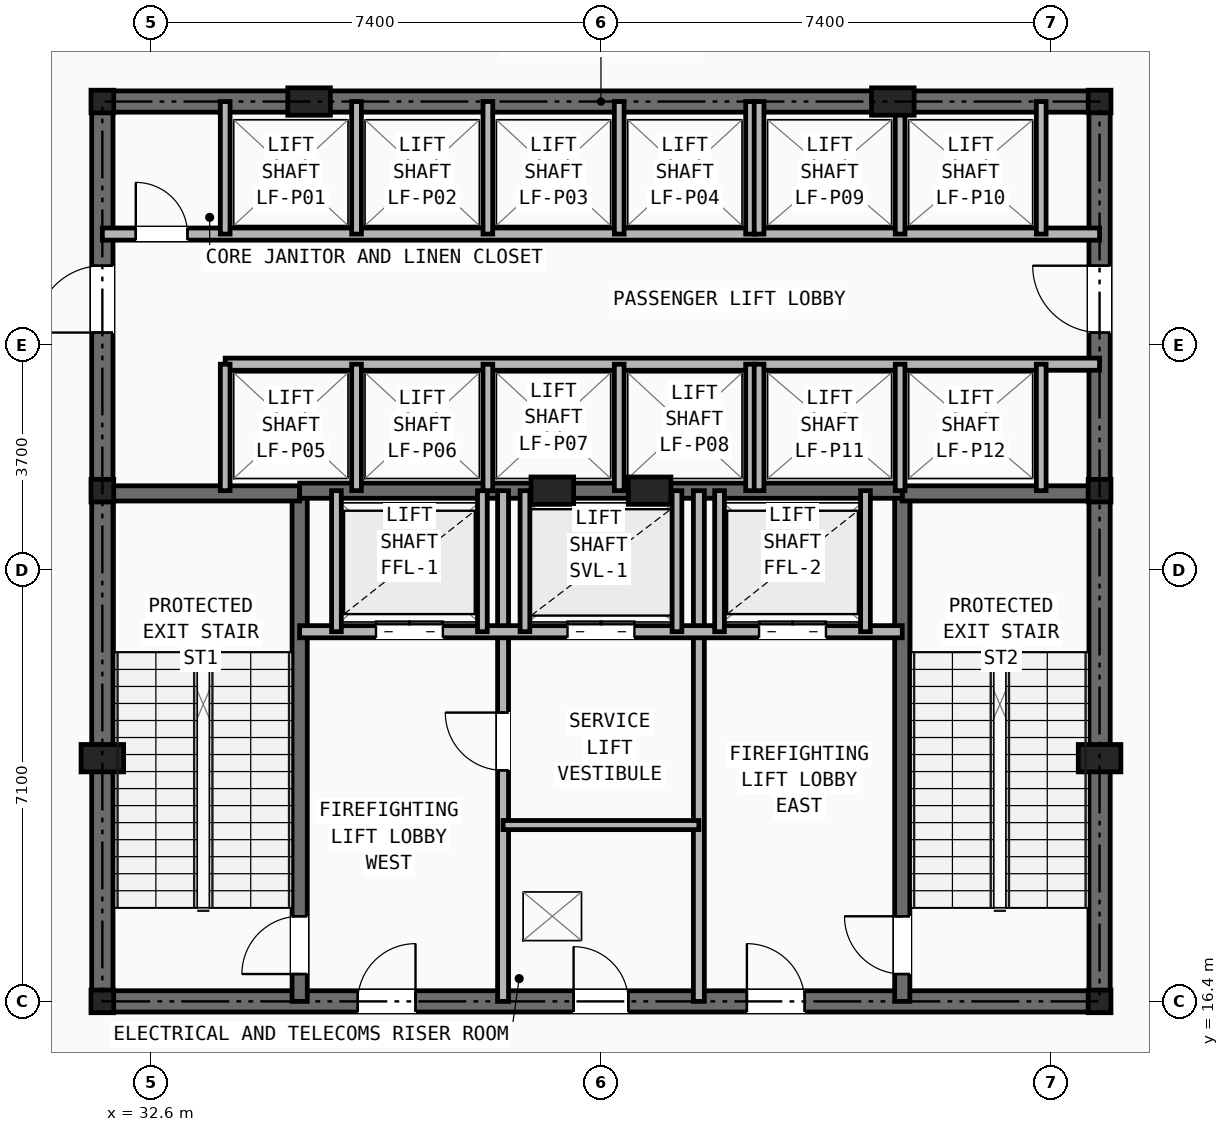
"""IFC4 building model, lengths in metres.
Left out: names, types, materials, properties, quantities, classifications, styles, units other than length and angle.
Written with IfcOpenShell. Run it as: python <this file> out.ifc"""

import sys

from ifc_helpers import new_model, si_unit, direction, frame, frame_2d, origin, origin_2d, place, context, subcontext, project, spatial, rectangle, i_section, extrude, element, fill, save


model = new_model("IFC4")
c1 = context("Model", 3, precision=1e-05, world=origin(), true_north=direction((0.0, 1.0)))
c2 = subcontext(c1, "Body", "Model", "MODEL_VIEW")
j1 = project(units=[si_unit("LENGTHUNIT", "METRE"), si_unit("PLANEANGLEUNIT", "RADIAN")], contexts=[c1])
p1 = place(None, origin())
s1 = spatial("IfcSite", under=j1, at=p1, CompositionType="ELEMENT")
p2 = place(p1, origin())
s2 = spatial("IfcBuilding", under=s1, at=p2, CompositionType="ELEMENT")
p3 = place(p2, frame((0.0, 0.0, 5.5)))
s3 = spatial("IfcBuildingStorey", under=s2, at=p3, CompositionType="ELEMENT", Elevation=5.5)
for number, where, z_axis, x_axis in (
    (1, (31.8, 16.4, 0.0), (0.0, 0.0, 1.0), (1.0, 0.0, 0.0)),
    (2, (48.2, 16.4, 0.0), (0.0, 0.0, 1.0), (1.0, 0.0, 0.0)),
    (3, (31.8, 24.8, 0.0), (0.0, 0.0, 1.0), (1.0, 0.0, 0.0)),
    (4, (48.2, 24.8, 0.0), (0.0, 0.0, 1.0), (1.0, 0.0, 0.0)),
    (5, (31.8, 31.2, 0.0), (0.0, 0.0, 1.0), (1.0, 0.0, 0.0)),
    (6, (48.2, 31.2, 0.0), (0.0, 0.0, 1.0), (1.0, 0.0, 0.0)),
):
    element("IfcColumn", number, at=place(p3, frame(where, z_axis=z_axis, x_axis=x_axis)), inside=s3, PredefinedType="COLUMN", context=c2, shape_type="SweptSolid", body=[
        extrude(i_section(OverallWidth=0.374, OverallDepth=0.372, WebThickness=0.016, FlangeThickness=0.026, at=origin_2d()), origin(), (0.0, 0.0, 1.0), 5.5),
    ])
for number, where, z_axis, x_axis in (
    (7, (31.8, 20.4, 0.0), (0.0, 0.0, 1.0), (1.0, 0.0, 0.0)),
    (8, (48.2, 20.4, 0.0), (0.0, 0.0, 1.0), (1.0, 0.0, 0.0)),
    (9, (35.2, 31.2, 0.0), (0.0, 0.0, 1.0), (1.0, 0.0, 0.0)),
    (10, (44.8, 31.2, 0.0), (0.0, 0.0, 1.0), (1.0, 0.0, 0.0)),
    (11, (39.2, 24.8, 0.0), (0.0, 0.0, 1.0), (1.0, 0.0, 0.0)),
    (12, (40.8, 24.8, 0.0), (0.0, 0.0, 1.0), (1.0, 0.0, 0.0)),
):
    element("IfcColumn", number, at=place(p3, frame(where, z_axis=z_axis, x_axis=x_axis)), inside=s3, PredefinedType="PILASTER", context=c2, shape_type="SweptSolid", body=[
        extrude(rectangle(XDim=0.7, YDim=0.45, at=origin_2d()), origin(), (0.0, 0.0, 1.0), 5.5),
    ])
p4 = place(p3, frame((31.8, 16.4, 0.0), z_axis=(0.0, 0.0, 1.0), x_axis=(1.0, 0.0, 0.0)))
e13 = element("IfcWall", 13, at=p4, inside=s3, PredefinedType="SHEAR", context=c2, shape_type="SweptSolid", body=[
    extrude(rectangle(XDim=16.4, YDim=0.35, at=frame_2d((8.2, 0.0))), origin(), (0.0, 0.0, 1.0), 5.18),
])
p5 = place(p4, frame((7.75, 0.0, 0.0)))
e14 = element("IfcOpeningElement", 14, at=p5, cuts=e13, PredefinedType="OPENING", context=c2, shape_type="SweptSolid", body=[
    extrude(rectangle(XDim=0.9, YDim=2.1, at=frame_2d((0.45, 1.05))), frame((0.0, 0.185, 0.0), z_axis=(0.0, -1.0, 0.0), x_axis=(1.0, 0.0, 0.0)), (0.0, 0.0, 1.0), 0.37),
])
p6 = place(p4, frame((4.2, 0.0, 0.0)))
e15 = element("IfcOpeningElement", 15, at=p6, cuts=e13, PredefinedType="OPENING", context=c2, shape_type="SweptSolid", body=[
    extrude(rectangle(XDim=0.95, YDim=2.1, at=frame_2d((0.475, 1.05))), frame((0.0, 0.185, 0.0), z_axis=(0.0, -1.0, 0.0), x_axis=(1.0, 0.0, 0.0)), (0.0, 0.0, 1.0), 0.37),
])
p7 = place(p4, frame((10.6, 0.0, 0.0)))
e16 = element("IfcOpeningElement", 16, at=p7, cuts=e13, PredefinedType="OPENING", context=c2, shape_type="SweptSolid", body=[
    extrude(rectangle(XDim=0.95, YDim=2.1, at=frame_2d((0.475, 1.05))), frame((0.0, 0.185, 0.0), z_axis=(0.0, -1.0, 0.0), x_axis=(1.0, 0.0, 0.0)), (0.0, 0.0, 1.0), 0.37),
])
p8 = place(p3, frame((31.8, 31.2, 0.0), z_axis=(0.0, 0.0, 1.0), x_axis=(1.0, 0.0, 0.0)))
e17 = element("IfcWall", 17, at=p8, inside=s3, PredefinedType="SHEAR", context=c2, shape_type="SweptSolid", body=[
    extrude(rectangle(XDim=16.4, YDim=0.35, at=frame_2d((8.2, 0.0))), origin(), (0.0, 0.0, 1.0), 5.18),
])
p9 = place(p3, frame((31.8, 16.4, 0.0), z_axis=(0.0, 0.0, 1.0), x_axis=(0.0, 1.0, 0.0)))
e18 = element("IfcWall", 18, at=p9, inside=s3, PredefinedType="SHEAR", context=c2, shape_type="SweptSolid", body=[
    extrude(rectangle(XDim=14.8, YDim=0.35, at=frame_2d((7.4, 0.0))), origin(), (0.0, 0.0, 1.0), 5.18),
])
p10 = place(p9, frame((11.0, 0.0, 0.0)))
e19 = element("IfcOpeningElement", 19, at=p10, cuts=e18, PredefinedType="OPENING", context=c2, shape_type="SweptSolid", body=[
    extrude(rectangle(XDim=1.1, YDim=2.15, at=frame_2d((0.55, 1.075))), frame((0.0, 0.185, 0.0), z_axis=(0.0, -1.0, 0.0), x_axis=(1.0, 0.0, 0.0)), (0.0, 0.0, 1.0), 0.37),
])
p11 = place(p3, frame((48.2, 16.4, 0.0), z_axis=(0.0, 0.0, 1.0), x_axis=(0.0, 1.0, 0.0)))
e20 = element("IfcWall", 20, at=p11, inside=s3, PredefinedType="SHEAR", context=c2, shape_type="SweptSolid", body=[
    extrude(rectangle(XDim=14.8, YDim=0.35, at=frame_2d((7.4, 0.0))), origin(), (0.0, 0.0, 1.0), 5.18),
])
p12 = place(p11, frame((11.0, 0.0, 0.0)))
e21 = element("IfcOpeningElement", 21, at=p12, cuts=e20, PredefinedType="OPENING", context=c2, shape_type="SweptSolid", body=[
    extrude(rectangle(XDim=1.1, YDim=2.15, at=frame_2d((0.55, 1.075))), frame((0.0, 0.185, 0.0), z_axis=(0.0, -1.0, 0.0), x_axis=(1.0, 0.0, 0.0)), (0.0, 0.0, 1.0), 0.37),
])
p13 = place(p3, frame((35.045, 16.4, 0.0), z_axis=(0.0, 0.0, 1.0), x_axis=(0.0, 1.0, 0.0)))
e22 = element("IfcWall", 22, at=p13, inside=s3, PredefinedType="SHEAR", context=c2, shape_type="SweptSolid", body=[
    extrude(rectangle(XDim=8.4, YDim=0.25, at=frame_2d((4.2, 0.0))), origin(), (0.0, 0.0, 1.0), 5.18),
])
p14 = place(p13, frame((0.45, 0.0, 0.0)))
e23 = element("IfcOpeningElement", 23, at=p14, cuts=e22, PredefinedType="OPENING", context=c2, shape_type="SweptSolid", body=[
    extrude(rectangle(XDim=0.95, YDim=2.1, at=frame_2d((0.475, 1.05))), frame((0.0, 0.135, 0.0), z_axis=(0.0, -1.0, 0.0), x_axis=(1.0, 0.0, 0.0)), (0.0, 0.0, 1.0), 0.27),
])
p15 = place(p3, frame((31.8, 24.755, 0.0), z_axis=(0.0, 0.0, 1.0), x_axis=(1.0, 0.0, 0.0)))
e24 = element("IfcWall", 24, at=p15, inside=s3, PredefinedType="SHEAR", context=c2, shape_type="SweptSolid", body=[
    extrude(rectangle(XDim=3.245, YDim=0.25, at=frame_2d((1.623, 0.0))), origin(), (0.0, 0.0, 1.0), 5.18),
])
p16 = place(p3, frame((44.955, 16.4, 0.0), z_axis=(0.0, 0.0, 1.0), x_axis=(0.0, 1.0, 0.0)))
e25 = element("IfcWall", 25, at=p16, inside=s3, PredefinedType="SHEAR", context=c2, shape_type="SweptSolid", body=[
    extrude(rectangle(XDim=8.4, YDim=0.25, at=frame_2d((4.2, 0.0))), origin(), (0.0, 0.0, 1.0), 5.18),
])
p17 = place(p16, frame((0.45, 0.0, 0.0)))
e26 = element("IfcOpeningElement", 26, at=p17, cuts=e25, PredefinedType="OPENING", context=c2, shape_type="SweptSolid", body=[
    extrude(rectangle(XDim=0.95, YDim=2.1, at=frame_2d((0.475, 1.05))), frame((0.0, 0.135, 0.0), z_axis=(0.0, -1.0, 0.0), x_axis=(1.0, 0.0, 0.0)), (0.0, 0.0, 1.0), 0.27),
])
p18 = place(p3, frame((44.955, 24.755, 0.0), z_axis=(0.0, 0.0, 1.0), x_axis=(1.0, 0.0, 0.0)))
e27 = element("IfcWall", 27, at=p18, inside=s3, PredefinedType="SHEAR", context=c2, shape_type="SweptSolid", body=[
    extrude(rectangle(XDim=3.245, YDim=0.25, at=frame_2d((1.623, 0.0))), origin(), (0.0, 0.0, 1.0), 5.18),
])
p19 = place(p3, frame((35.045, 24.8, 0.0), z_axis=(0.0, 0.0, 1.0), x_axis=(1.0, 0.0, 0.0)))
e28 = element("IfcWall", 28, at=p19, inside=s3, PredefinedType="SHEAR", context=c2, shape_type="SweptSolid", body=[
    extrude(rectangle(XDim=9.91, YDim=0.25, at=frame_2d((4.955, 0.0))), origin(), (0.0, 0.0, 1.0), 5.18),
])
p20 = place(p3, frame((38.39, 16.4, 0.0), z_axis=(0.0, 0.0, 1.0), x_axis=(0.0, 1.0, 0.0)))
e29 = element("IfcWall", 29, at=p20, inside=s3, PredefinedType="PARTITIONING", context=c2, shape_type="SweptSolid", body=[
    extrude(rectangle(XDim=8.4, YDim=0.18, at=frame_2d((4.2, 0.0))), origin(), (0.0, 0.0, 1.0), 4.631),
])
p21 = place(p20, frame((3.8, 0.0, 0.0)))
e30 = element("IfcOpeningElement", 30, at=p21, cuts=e29, PredefinedType="OPENING", context=c2, shape_type="SweptSolid", body=[
    extrude(rectangle(XDim=0.95, YDim=2.1, at=frame_2d((0.475, 1.05))), frame((0.0, 0.1, 0.0), z_axis=(0.0, -1.0, 0.0), x_axis=(1.0, 0.0, 0.0)), (0.0, 0.0, 1.0), 0.2),
])
p22 = place(p3, frame((41.61, 16.4, 0.0), z_axis=(0.0, 0.0, 1.0), x_axis=(0.0, 1.0, 0.0)))
e31 = element("IfcWall", 31, at=p22, inside=s3, PredefinedType="PARTITIONING", context=c2, shape_type="SweptSolid", body=[
    extrude(rectangle(XDim=8.4, YDim=0.18, at=frame_2d((4.2, 0.0))), origin(), (0.0, 0.0, 1.0), 4.631),
])
p23 = place(p3, frame((35.045, 22.48, 0.0), z_axis=(0.0, 0.0, 1.0), x_axis=(1.0, 0.0, 0.0)))
e32 = element("IfcWall", 32, at=p23, inside=s3, PredefinedType="SOLIDWALL", context=c2, shape_type="SweptSolid", body=[
    extrude(rectangle(XDim=9.91, YDim=0.2, at=frame_2d((4.955, 0.0))), origin(), (0.0, 0.0, 1.0), 5.18),
])
p24 = place(p23, frame((1.255, 0.0, 0.0)))
e33 = element("IfcOpeningElement", 33, at=p24, cuts=e32, PredefinedType="OPENING", context=c2, shape_type="SweptSolid", body=[
    extrude(rectangle(XDim=1.1, YDim=2.15, at=frame_2d((0.55, 1.075))), frame((0.0, 0.11, 0.0), z_axis=(0.0, -1.0, 0.0), x_axis=(1.0, 0.0, 0.0)), (0.0, 0.0, 1.0), 0.22),
])
p25 = place(p23, frame((7.555, 0.0, 0.0)))
e34 = element("IfcOpeningElement", 34, at=p25, cuts=e32, PredefinedType="OPENING", context=c2, shape_type="SweptSolid", body=[
    extrude(rectangle(XDim=1.1, YDim=2.15, at=frame_2d((0.55, 1.075))), frame((0.0, 0.11, 0.0), z_axis=(0.0, -1.0, 0.0), x_axis=(1.0, 0.0, 0.0)), (0.0, 0.0, 1.0), 0.22),
])
p26 = place(p23, frame((4.405, 0.0, 0.0)))
e35 = element("IfcOpeningElement", 35, at=p26, cuts=e32, PredefinedType="OPENING", context=c2, shape_type="SweptSolid", body=[
    extrude(rectangle(XDim=1.1, YDim=2.15, at=frame_2d((0.55, 1.075))), frame((0.0, 0.11, 0.0), z_axis=(0.0, -1.0, 0.0), x_axis=(1.0, 0.0, 0.0)), (0.0, 0.0, 1.0), 0.22),
])
p27 = place(p3, frame((38.39, 19.3, 0.0), z_axis=(0.0, 0.0, 1.0), x_axis=(1.0, 0.0, 0.0)))
e36 = element("IfcWall", 36, at=p27, inside=s3, PredefinedType="PARTITIONING", context=c2, shape_type="SweptSolid", body=[
    extrude(rectangle(XDim=3.22, YDim=0.15, at=frame_2d((1.61, 0.0))), origin(), (0.0, 0.0, 1.0), 5.18),
])
for number, where, z_axis, x_axis in (
    (37, (35.65, 22.48, 0.0), (0.0, 0.0, 1.0), (0.0, 1.0, 0.0)),
    (38, (38.05, 22.48, 0.0), (0.0, 0.0, 1.0), (0.0, 1.0, 0.0)),
    (39, (41.95, 22.48, 0.0), (0.0, 0.0, 1.0), (0.0, 1.0, 0.0)),
    (40, (44.35, 22.48, 0.0), (0.0, 0.0, 1.0), (0.0, 1.0, 0.0)),
    (41, (38.75, 22.48, 0.0), (0.0, 0.0, 1.0), (0.0, 1.0, 0.0)),
    (42, (41.25, 22.48, 0.0), (0.0, 0.0, 1.0), (0.0, 1.0, 0.0)),
):
    element("IfcWall", number, at=place(p3, frame(where, z_axis=z_axis, x_axis=x_axis)), inside=s3, PredefinedType="SOLIDWALL", context=c2, shape_type="SweptSolid", body=[
        extrude(rectangle(XDim=2.32, YDim=0.16, at=frame_2d((1.16, 0.0))), origin(), (0.0, 0.0, 1.0), 5.18),
    ])
p28 = place(p3, frame((31.8, 29.02, 0.0), z_axis=(0.0, 0.0, 1.0), x_axis=(1.0, 0.0, 0.0)))
e43 = element("IfcWall", 43, at=p28, inside=s3, PredefinedType="SOLIDWALL", context=c2, shape_type="SweptSolid", body=[
    extrude(rectangle(XDim=16.4, YDim=0.2, at=frame_2d((8.2, 0.0))), origin(), (0.0, 0.0, 1.0), 4.631),
])
p29 = place(p28, frame((0.55, 0.0, 0.0)))
e44 = element("IfcOpeningElement", 44, at=p29, cuts=e43, PredefinedType="OPENING", context=c2, shape_type="SweptSolid", body=[
    extrude(rectangle(XDim=0.85, YDim=2.05, at=frame_2d((0.425, 1.025))), frame((0.0, 0.11, 0.0), z_axis=(0.0, -1.0, 0.0), x_axis=(1.0, 0.0, 0.0)), (0.0, 0.0, 1.0), 0.22),
])
p30 = place(p3, frame((33.82, 26.88, 0.0), z_axis=(0.0, 0.0, 1.0), x_axis=(1.0, 0.0, 0.0)))
e45 = element("IfcWall", 45, at=p30, inside=s3, PredefinedType="SOLIDWALL", context=c2, shape_type="SweptSolid", body=[
    extrude(rectangle(XDim=14.38, YDim=0.2, at=frame_2d((7.19, 0.0))), origin(), (0.0, 0.0, 1.0), 4.631),
])
p31 = place(p3, frame((33.82, 29.02, 0.0), z_axis=(0.0, 0.0, 1.0), x_axis=(0.0, 1.0, 0.0)))
e46 = element("IfcWall", 46, at=p31, inside=s3, PredefinedType="SOLIDWALL", context=c2, shape_type="SweptSolid", body=[
    extrude(rectangle(XDim=2.18, YDim=0.16, at=frame_2d((1.09, 0.0))), origin(), (0.0, 0.0, 1.0), 4.631),
])
p32 = place(p3, frame((33.82, 24.8, 0.0), z_axis=(0.0, 0.0, 1.0), x_axis=(0.0, 1.0, 0.0)))
e47 = element("IfcWall", 47, at=p32, inside=s3, PredefinedType="SOLIDWALL", context=c2, shape_type="SweptSolid", body=[
    extrude(rectangle(XDim=2.08, YDim=0.16, at=frame_2d((1.04, 0.0))), origin(), (0.0, 0.0, 1.0), 5.18),
])
for number, where, z_axis, x_axis in (
    (48, (35.98, 29.02, 0.0), (0.0, 0.0, 1.0), (0.0, 1.0, 0.0)),
    (49, (38.14, 29.02, 0.0), (0.0, 0.0, 1.0), (0.0, 1.0, 0.0)),
    (50, (40.3, 29.02, 0.0), (0.0, 0.0, 1.0), (0.0, 1.0, 0.0)),
    (51, (42.46, 29.02, 0.0), (0.0, 0.0, 1.0), (0.0, 1.0, 0.0)),
):
    element("IfcWall", number, at=place(p3, frame(where, z_axis=z_axis, x_axis=x_axis)), inside=s3, PredefinedType="SOLIDWALL", context=c2, shape_type="SweptSolid", body=[
        extrude(rectangle(XDim=2.18, YDim=0.16, at=frame_2d((1.09, 0.0))), origin(), (0.0, 0.0, 1.0), 4.631),
    ])
for number, where, z_axis, x_axis in (
    (52, (35.98, 24.8, 0.0), (0.0, 0.0, 1.0), (0.0, 1.0, 0.0)),
    (53, (38.14, 24.8, 0.0), (0.0, 0.0, 1.0), (0.0, 1.0, 0.0)),
    (54, (40.3, 24.8, 0.0), (0.0, 0.0, 1.0), (0.0, 1.0, 0.0)),
    (55, (42.46, 24.8, 0.0), (0.0, 0.0, 1.0), (0.0, 1.0, 0.0)),
):
    element("IfcWall", number, at=place(p3, frame(where, z_axis=z_axis, x_axis=x_axis)), inside=s3, PredefinedType="SOLIDWALL", context=c2, shape_type="SweptSolid", body=[
        extrude(rectangle(XDim=2.08, YDim=0.16, at=frame_2d((1.04, 0.0))), origin(), (0.0, 0.0, 1.0), 5.18),
    ])
for number, where, z_axis, x_axis in (
    (56, (42.6, 29.02, 0.0), (0.0, 0.0, 1.0), (0.0, 1.0, 0.0)),
    (57, (44.92, 29.02, 0.0), (0.0, 0.0, 1.0), (0.0, 1.0, 0.0)),
    (58, (47.24, 29.02, 0.0), (0.0, 0.0, 1.0), (0.0, 1.0, 0.0)),
):
    element("IfcWall", number, at=place(p3, frame(where, z_axis=z_axis, x_axis=x_axis)), inside=s3, PredefinedType="SOLIDWALL", context=c2, shape_type="SweptSolid", body=[
        extrude(rectangle(XDim=2.18, YDim=0.16, at=frame_2d((1.09, 0.0))), origin(), (0.0, 0.0, 1.0), 4.631),
    ])
for number, where, z_axis, x_axis in (
    (59, (42.6, 24.8, 0.0), (0.0, 0.0, 1.0), (0.0, 1.0, 0.0)),
    (60, (44.92, 24.8, 0.0), (0.0, 0.0, 1.0), (0.0, 1.0, 0.0)),
    (61, (47.24, 24.8, 0.0), (0.0, 0.0, 1.0), (0.0, 1.0, 0.0)),
):
    element("IfcWall", number, at=place(p3, frame(where, z_axis=z_axis, x_axis=x_axis)), inside=s3, PredefinedType="SOLIDWALL", context=c2, shape_type="SweptSolid", body=[
        extrude(rectangle(XDim=2.08, YDim=0.16, at=frame_2d((1.04, 0.0))), origin(), (0.0, 0.0, 1.0), 5.18),
    ])
p33 = place(p5, origin())
e62 = element("IfcDoor", 62, at=p33, inside=s3, OperationType="SINGLE_SWING_LEFT", PredefinedType="DOOR", context=c2, shape_type="SweptSolid", body=[
    extrude(rectangle(XDim=0.9, YDim=2.1, at=frame_2d((0.45, 1.05))), frame((0.0, 0.025, 0.0), z_axis=(0.0, -1.0, 0.0), x_axis=(1.0, 0.0, 0.0)), (0.0, 0.0, 1.0), 0.05),
])
fill(e14, e62)
p34 = place(p21, origin())
e63 = element("IfcDoor", 63, at=p34, inside=s3, OperationType="SINGLE_SWING_RIGHT", PredefinedType="DOOR", context=c2, shape_type="SweptSolid", body=[
    extrude(rectangle(XDim=0.95, YDim=2.1, at=frame_2d((0.475, 1.05))), frame((0.0, 0.025, 0.0), z_axis=(0.0, -1.0, 0.0), x_axis=(1.0, 0.0, 0.0)), (0.0, 0.0, 1.0), 0.05),
])
fill(e30, e63)
p35 = place(p14, origin())
e64 = element("IfcDoor", 64, at=p35, inside=s3, OperationType="SINGLE_SWING_LEFT", PredefinedType="DOOR", context=c2, shape_type="SweptSolid", body=[
    extrude(rectangle(XDim=0.95, YDim=2.1, at=frame_2d((0.475, 1.05))), frame((0.0, 0.025, 0.0), z_axis=(0.0, -1.0, 0.0), x_axis=(1.0, 0.0, 0.0)), (0.0, 0.0, 1.0), 0.05),
])
fill(e23, e64)
p36 = place(p17, origin())
e65 = element("IfcDoor", 65, at=p36, inside=s3, OperationType="SINGLE_SWING_RIGHT", PredefinedType="DOOR", context=c2, shape_type="SweptSolid", body=[
    extrude(rectangle(XDim=0.95, YDim=2.1, at=frame_2d((0.475, 1.05))), frame((0.0, 0.025, 0.0), z_axis=(0.0, -1.0, 0.0), x_axis=(1.0, 0.0, 0.0)), (0.0, 0.0, 1.0), 0.05),
])
fill(e26, e65)
p37 = place(p6, origin())
e66 = element("IfcDoor", 66, at=p37, inside=s3, OperationType="SINGLE_SWING_RIGHT", PredefinedType="DOOR", context=c2, shape_type="SweptSolid", body=[
    extrude(rectangle(XDim=0.95, YDim=2.1, at=frame_2d((0.475, 1.05))), frame((0.0, 0.025, 0.0), z_axis=(0.0, -1.0, 0.0), x_axis=(1.0, 0.0, 0.0)), (0.0, 0.0, 1.0), 0.05),
])
fill(e15, e66)
p38 = place(p7, origin())
e67 = element("IfcDoor", 67, at=p38, inside=s3, OperationType="SINGLE_SWING_LEFT", PredefinedType="DOOR", context=c2, shape_type="SweptSolid", body=[
    extrude(rectangle(XDim=0.95, YDim=2.1, at=frame_2d((0.475, 1.05))), frame((0.0, 0.025, 0.0), z_axis=(0.0, -1.0, 0.0), x_axis=(1.0, 0.0, 0.0)), (0.0, 0.0, 1.0), 0.05),
])
fill(e16, e67)
p39 = place(p24, origin())
e68 = element("IfcDoor", 68, at=p39, inside=s3, OperationType="DOUBLE_DOOR_SLIDING", PredefinedType="DOOR", context=c2, shape_type="SweptSolid", body=[
    extrude(rectangle(XDim=1.1, YDim=2.15, at=frame_2d((0.55, 1.075))), frame((0.0, 0.025, 0.0), z_axis=(0.0, -1.0, 0.0), x_axis=(1.0, 0.0, 0.0)), (0.0, 0.0, 1.0), 0.05),
])
fill(e33, e68)
p40 = place(p25, origin())
e69 = element("IfcDoor", 69, at=p40, inside=s3, OperationType="DOUBLE_DOOR_SLIDING", PredefinedType="DOOR", context=c2, shape_type="SweptSolid", body=[
    extrude(rectangle(XDim=1.1, YDim=2.15, at=frame_2d((0.55, 1.075))), frame((0.0, 0.025, 0.0), z_axis=(0.0, -1.0, 0.0), x_axis=(1.0, 0.0, 0.0)), (0.0, 0.0, 1.0), 0.05),
])
fill(e34, e69)
p41 = place(p26, origin())
e70 = element("IfcDoor", 70, at=p41, inside=s3, OperationType="DOUBLE_DOOR_SLIDING", PredefinedType="DOOR", context=c2, shape_type="SweptSolid", body=[
    extrude(rectangle(XDim=1.1, YDim=2.15, at=frame_2d((0.55, 1.075))), frame((0.0, 0.025, 0.0), z_axis=(0.0, -1.0, 0.0), x_axis=(1.0, 0.0, 0.0)), (0.0, 0.0, 1.0), 0.05),
])
fill(e35, e70)
p42 = place(p29, origin())
e71 = element("IfcDoor", 71, at=p42, inside=s3, OperationType="SINGLE_SWING_LEFT", PredefinedType="DOOR", context=c2, shape_type="SweptSolid", body=[
    extrude(rectangle(XDim=0.85, YDim=2.05, at=frame_2d((0.425, 1.025))), frame((0.0, 0.025, 0.0), z_axis=(0.0, -1.0, 0.0), x_axis=(1.0, 0.0, 0.0)), (0.0, 0.0, 1.0), 0.05),
])
fill(e44, e71)
p43 = place(p10, origin())
e72 = element("IfcDoor", 72, at=p43, inside=s3, OperationType="SINGLE_SWING_LEFT", PredefinedType="DOOR", context=c2, shape_type="SweptSolid", body=[
    extrude(rectangle(XDim=1.1, YDim=2.15, at=frame_2d((0.55, 1.075))), frame((0.0, 0.025, 0.0), z_axis=(0.0, -1.0, 0.0), x_axis=(1.0, 0.0, 0.0)), (0.0, 0.0, 1.0), 0.05),
])
fill(e19, e72)
p44 = place(p12, origin())
e73 = element("IfcDoor", 73, at=p44, inside=s3, OperationType="SINGLE_SWING_RIGHT", PredefinedType="DOOR", context=c2, shape_type="SweptSolid", body=[
    extrude(rectangle(XDim=1.1, YDim=2.15, at=frame_2d((0.55, 1.075))), frame((0.0, 0.025, 0.0), z_axis=(0.0, -1.0, 0.0), x_axis=(1.0, 0.0, 0.0)), (0.0, 0.0, 1.0), 0.05),
])
fill(e21, e73)
save(model, sys.argv[1])
